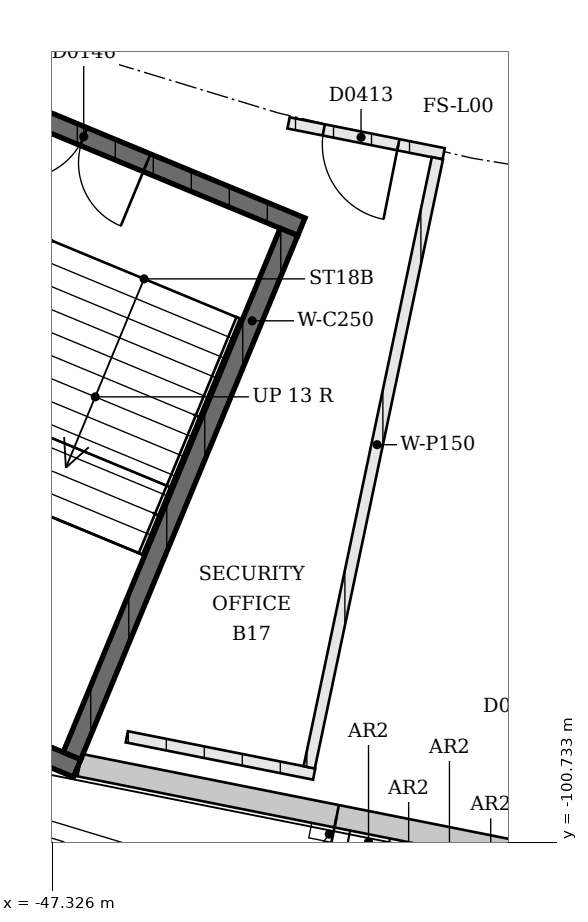
"""IFC4 building model, lengths in metres.
Left out: names, types, materials, properties, quantities, classifications, styles, units other than length and angle.
Written with IfcOpenShell. Run it as: python <this file> out.ifc"""

import sys

from ifc_helpers import new_model, si_unit, direction, frame, frame_2d, origin, place, context, subcontext, project, spatial, rectangle, extrude, element, fill, save


model = new_model("IFC4")
c1 = context("Model", 3, precision=1e-05, world=origin(), true_north=direction((0.0, 1.0)))
c2 = subcontext(c1, "Body", "Model", "MODEL_VIEW")
j1 = project(units=[si_unit("LENGTHUNIT", "METRE"), si_unit("PLANEANGLEUNIT", "RADIAN")], contexts=[c1])
p1 = place(None, origin())
s1 = spatial("IfcSite", under=j1, at=p1, CompositionType="ELEMENT")
p2 = place(p1, origin())
s2 = spatial("IfcBuilding", under=s1, at=p2, CompositionType="ELEMENT")
p3 = place(p2, origin())
s3 = spatial("IfcBuildingStorey", under=s2, at=p3, CompositionType="ELEMENT", Elevation=0.0)
p4 = place(p3, frame((-34.5, -102.197, 0.0), z_axis=(0.0, 0.0, 1.0), x_axis=(-0.980786240062, 0.195085497421, 0.0)))
e1 = element("IfcWall", 1, at=p4, inside=s3, PredefinedType="SOLIDWALL", context=c2, shape_type="SweptSolid", body=[
    extrude(rectangle(XDim=12.711, YDim=0.3, at=frame_2d((6.355, 0.0))), origin(), (0.0, 0.0, 1.0), 2.79),
])
p5 = place(p4, frame((4.463, 0.0, 0.0)))
e2 = element("IfcOpeningElement", 2, at=p5, cuts=e1, PredefinedType="OPENING", context=c2, shape_type="SweptSolid", body=[
    extrude(rectangle(XDim=4.8, YDim=2.4, at=frame_2d((2.4, 1.2))), frame((0.0, 0.16, 0.0), z_axis=(0.0, -1.0, 0.0), x_axis=(1.0, 0.0, 0.0)), (0.0, 0.0, 1.0), 0.32),
])
p6 = place(p3, frame((-55.274, -87.985, 0.0), z_axis=(0.0, 0.0, 1.0), x_axis=(0.923877480578, -0.382688386133, 0.0)))
e3 = element("IfcWall", 3, at=p6, inside=s3, PredefinedType="SHEAR", context=c2, shape_type="SweptSolid", body=[
    extrude(rectangle(XDim=12.15, YDim=0.25, at=frame_2d((6.075, 0.0))), origin(), (0.0, 0.0, 1.0), 4.09),
])
p7 = place(p6, frame((2.2, 0.0, 0.0)))
e4 = element("IfcOpeningElement", 4, at=p7, cuts=e3, PredefinedType="OPENING", context=c2, shape_type="SweptSolid", body=[
    extrude(rectangle(XDim=1.8, YDim=2.1, at=frame_2d((0.9, 1.05))), frame((0.0, 0.125, 0.0), z_axis=(0.0, -1.0, 0.0), x_axis=(1.0, 0.0, 0.0)), (0.0, 0.0, 1.0), 0.25),
])
p8 = place(p6, frame((8.15, 0.0, 0.0)))
e5 = element("IfcOpeningElement", 5, at=p8, cuts=e3, PredefinedType="OPENING", context=c2, shape_type="SweptSolid", body=[
    extrude(rectangle(XDim=1.8, YDim=2.1, at=frame_2d((0.9, 1.05))), frame((0.0, 0.125, 0.0), z_axis=(0.0, -1.0, 0.0), x_axis=(1.0, 0.0, 0.0)), (0.0, 0.0, 1.0), 0.25),
])
p9 = place(p3, frame((-58.224, -95.108, 0.0), z_axis=(0.0, 0.0, 1.0), x_axis=(0.923884584817, -0.382671234792, 0.0)))
e6 = element("IfcWall", 6, at=p9, inside=s3, PredefinedType="SHEAR", context=c2, shape_type="SweptSolid", body=[
    extrude(rectangle(XDim=12.15, YDim=0.25, at=frame_2d((6.075, 0.0))), origin(), (0.0, 0.0, 1.0), 4.09),
])
p10 = place(p3, frame((-44.212, -92.702, 0.0), z_axis=(0.0, 0.0, 1.0), x_axis=(-0.382664910245, -0.923887204407, 0.0)))
e7 = element("IfcWall", 7, at=p10, inside=s3, PredefinedType="SHEAR", context=c2, shape_type="SweptSolid", body=[
    extrude(rectangle(XDim=7.46, YDim=0.25, at=frame_2d((3.73, 0.0))), origin(), (0.0, 0.0, 1.0), 4.09),
])
p11 = place(p3, frame((-44.217, -91.268, 0.0), z_axis=(0.0, 0.0, 1.0), x_axis=(0.980769797582, -0.195168143279, 0.0)))
e8 = element("IfcWall", 8, at=p11, inside=s3, PredefinedType="PARTITIONING", context=c2, shape_type="SweptSolid", body=[
    extrude(rectangle(XDim=2.08, YDim=0.15, at=frame_2d((1.04, 0.0))), origin(), (0.0, 0.0, 1.0), 3.0),
])
p12 = place(p11, frame((0.472, 0.0, 0.0)))
e9 = element("IfcOpeningElement", 9, at=p12, cuts=e8, PredefinedType="OPENING", context=c2, shape_type="SweptSolid", body=[
    extrude(rectangle(XDim=1.0, YDim=2.1, at=frame_2d((0.5, 1.05))), frame((0.0, 0.075, 0.0), z_axis=(0.0, -1.0, 0.0), x_axis=(1.0, 0.0, 0.0)), (0.0, 0.0, 1.0), 0.15),
])
p13 = place(p3, frame((-46.346, -99.344, 0.0), z_axis=(0.0, 0.0, 1.0), x_axis=(0.980778163577, -0.195126097309, 0.0)))
e10 = element("IfcWall", 10, at=p13, inside=s3, PredefinedType="PARTITIONING", context=c2, shape_type="SweptSolid", body=[
    extrude(rectangle(XDim=2.514, YDim=0.15, at=frame_2d((1.257, 0.0))), origin(), (0.0, 0.0, 1.0), 3.0),
])
p14 = place(p3, frame((-42.259, -91.732, 0.0), z_axis=(0.0, 0.0, 1.0), x_axis=(-0.206011983374, -0.978549468707, 0.0)))
e11 = element("IfcWall", 11, at=p14, inside=s3, PredefinedType="PARTITIONING", context=c2, shape_type="SweptSolid", body=[
    extrude(rectangle(XDim=8.19, YDim=0.15, at=frame_2d((4.095, 0.0))), origin(), (0.0, 0.0, 1.0), 3.0),
])
p15 = place(p5, origin())
e12 = element("IfcDoor", 12, at=p15, inside=s3, OperationType="DOUBLE_DOOR_SINGLE_SWING", PredefinedType="DOOR", context=c2, shape_type="SweptSolid", body=[
    extrude(rectangle(XDim=4.8, YDim=2.4, at=frame_2d((2.4, 1.2))), frame((0.0, 0.025, 0.0), z_axis=(0.0, -1.0, 0.0), x_axis=(1.0, 0.0, 0.0)), (0.0, 0.0, 1.0), 0.05),
])
fill(e2, e12)
p16 = place(p8, origin())
e13 = element("IfcDoor", 13, at=p16, inside=s3, OperationType="DOUBLE_DOOR_SINGLE_SWING", PredefinedType="DOOR", context=c2, shape_type="SweptSolid", body=[
    extrude(rectangle(XDim=1.8, YDim=2.1, at=frame_2d((0.9, 1.05))), frame((0.0, 0.025, 0.0), z_axis=(0.0, -1.0, 0.0), x_axis=(1.0, 0.0, 0.0)), (0.0, 0.0, 1.0), 0.05),
])
fill(e5, e13)
p17 = place(p12, origin())
e14 = element("IfcDoor", 14, at=p17, inside=s3, OperationType="SINGLE_SWING_RIGHT", PredefinedType="DOOR", context=c2, shape_type="SweptSolid", body=[
    extrude(rectangle(XDim=1.0, YDim=2.1, at=frame_2d((0.5, 1.05))), frame((0.0, 0.025, 0.0), z_axis=(0.0, -1.0, 0.0), x_axis=(1.0, 0.0, 0.0)), (0.0, 0.0, 1.0), 0.05),
])
fill(e9, e14)
save(model, sys.argv[1])
